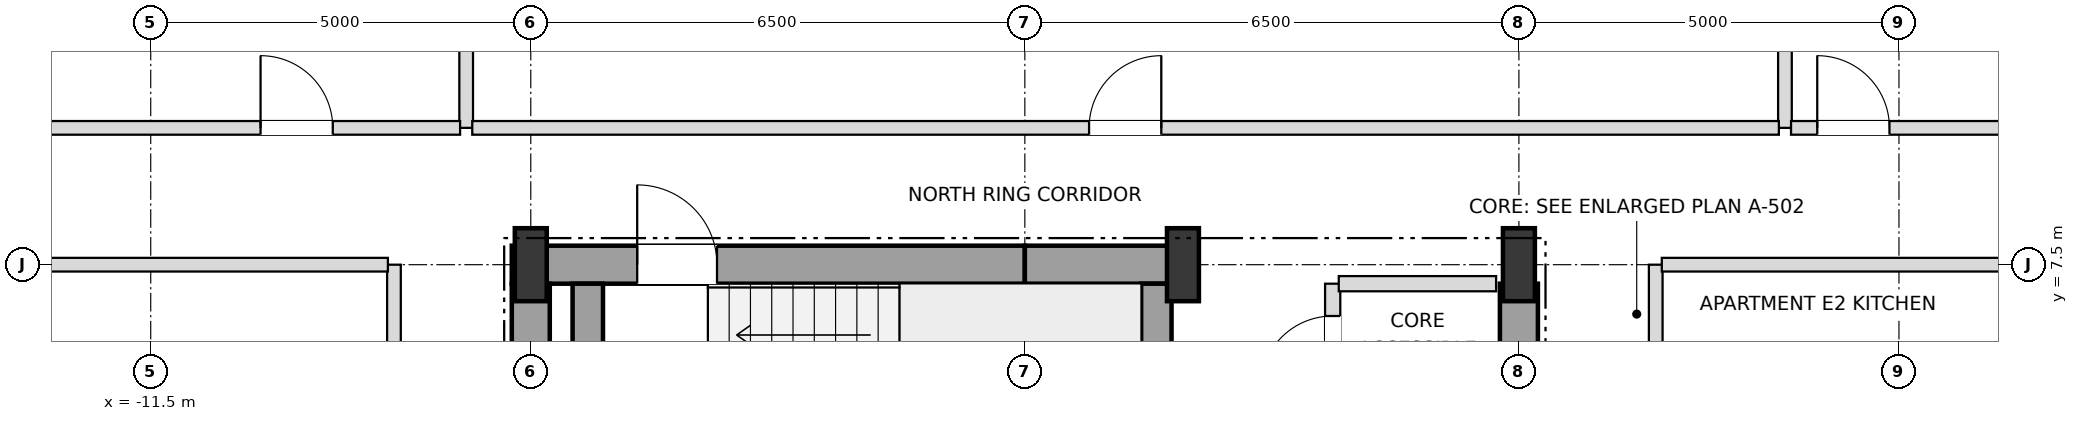
"""IFC4 building model, lengths in metres.
Left out: names, types, materials, properties, quantities, classifications, styles, units other than length and angle.
Written with IfcOpenShell. Run it as: python <this file> out.ifc"""

import sys

from ifc_helpers import new_model, si_unit, direction, frame, frame_2d, origin, origin_2d, place, context, subcontext, project, spatial, rectangle, i_section, extrude, element, fill, save


model = new_model("IFC4")
c1 = context("Model", 3, precision=1e-05, world=origin(), true_north=direction((0.0, 1.0)))
c2 = subcontext(c1, "Body", "Model", "MODEL_VIEW")
j1 = project(units=[si_unit("LENGTHUNIT", "METRE"), si_unit("PLANEANGLEUNIT", "RADIAN")], contexts=[c1])
p1 = place(None, origin())
s1 = spatial("IfcSite", under=j1, at=p1, CompositionType="ELEMENT")
p2 = place(p1, origin())
s2 = spatial("IfcBuilding", under=s1, at=p2, CompositionType="ELEMENT")
p3 = place(p2, frame((0.0, 0.0, 72.0)))
s3 = spatial("IfcBuildingStorey", under=s2, at=p3, CompositionType="ELEMENT", Elevation=72.0)
for number, where, z_axis, x_axis in (
    (1, (-6.5, 7.5, 0.0), (0.0, 0.0, 1.0), (1.0, 0.0, 0.0)),
    (2, (2.08, 7.5, 0.0), (0.0, 0.0, 1.0), (1.0, 0.0, 0.0)),
    (3, (6.5, 7.5, 0.0), (0.0, 0.0, 1.0), (1.0, 0.0, 0.0)),
):
    element("IfcColumn", number, at=place(p3, frame(where, z_axis=z_axis, x_axis=x_axis)), inside=s3, PredefinedType="COLUMN", context=c2, shape_type="SweptSolid", body=[
        extrude(i_section(OverallWidth=0.42, OverallDepth=0.96, WebThickness=0.022, FlangeThickness=0.034, at=origin_2d()), origin(), (0.0, 0.0, 1.0), 3.6),
    ])
p4 = place(p3, frame((-6.75, 7.5, 0.0), z_axis=(0.0, 0.0, 1.0), x_axis=(1.0, 0.0, 0.0)))
e4 = element("IfcWall", 4, at=p4, inside=s3, PredefinedType="SHEAR", context=c2, shape_type="SweptSolid", body=[
    extrude(rectangle(XDim=6.75, YDim=0.5, at=frame_2d((3.375, 0.0))), origin(), (0.0, 0.0, 1.0), 3.38),
])
p5 = place(p4, frame((1.65, 0.0, 0.0)))
e5 = element("IfcOpeningElement", 5, at=p5, cuts=e4, PredefinedType="OPENING", context=c2, shape_type="SweptSolid", body=[
    extrude(rectangle(XDim=1.05, YDim=2.15, at=frame_2d((0.525, 1.075))), frame((0.0, 0.26, 0.0), z_axis=(0.0, -1.0, 0.0), x_axis=(1.0, 0.0, 0.0)), (0.0, 0.0, 1.0), 0.52),
])
p6 = place(p3, frame((0.0, 7.5, 0.0), z_axis=(0.0, 0.0, 1.0), x_axis=(1.0, 0.0, 0.0)))
e6 = element("IfcWall", 6, at=p6, inside=s3, PredefinedType="SHEAR", context=c2, shape_type="SweptSolid", body=[
    extrude(rectangle(XDim=2.08, YDim=0.5, at=frame_2d((1.04, 0.0))), origin(), (0.0, 0.0, 1.0), 3.38),
])
for number, where, z_axis, x_axis in (
    (7, (-6.5, 3.95, 0.0), (0.0, 0.0, 1.0), (0.0, 1.0, 0.0)),
    (8, (6.5, 3.95, 0.0), (0.0, 0.0, 1.0), (0.0, 1.0, 0.0)),
):
    element("IfcWall", number, at=place(p3, frame(where, z_axis=z_axis, x_axis=x_axis)), inside=s3, PredefinedType="SHEAR", context=c2, shape_type="SweptSolid", body=[
        extrude(rectangle(XDim=3.3, YDim=0.5, at=frame_2d((1.65, 0.0))), origin(), (0.0, 0.0, 1.0), 3.38),
    ])
for number, where, z_axis, x_axis in (
    (9, (1.73, 3.95, 0.0), (0.0, 0.0, 1.0), (0.0, 1.0, 0.0)),
    (10, (-5.75, 3.95, 0.0), (0.0, 0.0, 1.0), (0.0, 1.0, 0.0)),
):
    element("IfcWall", number, at=place(p3, frame(where, z_axis=z_axis, x_axis=x_axis)), inside=s3, PredefinedType="SHEAR", context=c2, shape_type="SweptSolid", body=[
        extrude(rectangle(XDim=3.3, YDim=0.4, at=frame_2d((1.65, 0.0))), origin(), (0.0, 0.0, 1.0), 3.38),
    ])
p7 = place(p3, frame((-8.3, -7.5, 0.0), z_axis=(0.0, 0.0, 1.0), x_axis=(0.0, 1.0, 0.0)))
e11 = element("IfcWall", 11, at=p7, inside=s3, PredefinedType="PARTITIONING", context=c2, shape_type="SweptSolid", body=[
    extrude(rectangle(XDim=15.0, YDim=0.18, at=frame_2d((7.5, 0.0))), origin(), (0.0, 0.0, 1.0), 3.38),
])
p8 = place(p7, frame((3.475, 0.0, 0.0)))
e12 = element("IfcOpeningElement", 12, at=p8, cuts=e11, PredefinedType="OPENING", context=c2, shape_type="SweptSolid", body=[
    extrude(rectangle(XDim=0.95, YDim=2.15, at=frame_2d((0.475, 1.075))), frame((0.0, 0.1, 0.0), z_axis=(0.0, -1.0, 0.0), x_axis=(1.0, 0.0, 0.0)), (0.0, 0.0, 1.0), 0.2),
])
p9 = place(p3, frame((-7.35, 9.3, 0.0), z_axis=(0.0, 0.0, 1.0), x_axis=(0.0, 1.0, 0.0)))
e13 = element("IfcWall", 13, at=p9, inside=s3, PredefinedType="PARTITIONING", context=c2, shape_type="SweptSolid", body=[
    extrude(rectangle(XDim=15.6, YDim=0.18, at=frame_2d((7.8, 0.0))), origin(), (0.0, 0.0, 1.0), 2.816),
])
p10 = place(p3, frame((4.05, 5.55, 0.0), z_axis=(0.0, 0.0, 1.0), x_axis=(0.0, 1.0, 0.0)))
e14 = element("IfcWall", 14, at=p10, inside=s3, PredefinedType="SOLIDWALL", context=c2, shape_type="SweptSolid", body=[
    extrude(rectangle(XDim=1.7, YDim=0.2, at=frame_2d((0.85, 0.0))), origin(), (0.0, 0.0, 1.0), 3.38),
])
p11 = place(p10, frame((0.325, 0.0, 0.0)))
e15 = element("IfcOpeningElement", 15, at=p11, cuts=e14, PredefinedType="OPENING", context=c2, shape_type="SweptSolid", body=[
    extrude(rectangle(XDim=0.95, YDim=2.15, at=frame_2d((0.475, 1.075))), frame((0.0, 0.11, 0.0), z_axis=(0.0, -1.0, 0.0), x_axis=(1.0, 0.0, 0.0)), (0.0, 0.0, 1.0), 0.22),
])
p12 = place(p3, frame((8.3, -7.5, 0.0), z_axis=(0.0, 0.0, 1.0), x_axis=(0.0, 1.0, 0.0)))
e16 = element("IfcWall", 16, at=p12, inside=s3, PredefinedType="PARTITIONING", context=c2, shape_type="SweptSolid", body=[
    extrude(rectangle(XDim=15.0, YDim=0.18, at=frame_2d((7.5, 0.0))), origin(), (0.0, 0.0, 1.0), 3.38),
])
p13 = place(p12, frame((3.305, 0.0, 0.0)))
e17 = element("IfcOpeningElement", 17, at=p13, cuts=e16, PredefinedType="OPENING", context=c2, shape_type="SweptSolid", body=[
    extrude(rectangle(XDim=0.95, YDim=2.15, at=frame_2d((0.475, 1.075))), frame((0.0, 0.1, 0.0), z_axis=(0.0, -1.0, 0.0), x_axis=(1.0, 0.0, 0.0)), (0.0, 0.0, 1.0), 0.2),
])
p14 = place(p12, frame((10.805, 0.0, 0.0)))
e18 = element("IfcOpeningElement", 18, at=p14, cuts=e16, PredefinedType="OPENING", context=c2, shape_type="SweptSolid", body=[
    extrude(rectangle(XDim=0.95, YDim=2.15, at=frame_2d((0.475, 1.075))), frame((0.0, 0.1, 0.0), z_axis=(0.0, -1.0, 0.0), x_axis=(1.0, 0.0, 0.0)), (0.0, 0.0, 1.0), 0.2),
])
p15 = place(p3, frame((10.0, 9.3, 0.0), z_axis=(0.0, 0.0, 1.0), x_axis=(0.0, 1.0, 0.0)))
e19 = element("IfcWall", 19, at=p15, inside=s3, PredefinedType="PARTITIONING", context=c2, shape_type="SweptSolid", body=[
    extrude(rectangle(XDim=15.6, YDim=0.18, at=frame_2d((7.8, 0.0))), origin(), (0.0, 0.0, 1.0), 2.816),
])
p16 = place(p3, frame((4.13, 7.25, 0.0), z_axis=(0.0, 0.0, 1.0), x_axis=(1.0, 0.0, 0.0)))
e20 = element("IfcWall", 20, at=p16, inside=s3, PredefinedType="SOLIDWALL", context=c2, shape_type="SweptSolid", body=[
    extrude(rectangle(XDim=2.07, YDim=0.2, at=frame_2d((1.035, 0.0))), origin(), (0.0, 0.0, 1.0), 3.38),
])
for number, where, z_axis, x_axis in (
    (21, (-16.02, 7.5, 0.0), (0.0, 0.0, 1.0), (1.0, 0.0, 0.0)),
    (22, (8.38, 7.5, 0.0), (0.0, 0.0, 1.0), (1.0, 0.0, 0.0)),
):
    element("IfcWall", number, at=place(p3, frame(where, z_axis=z_axis, x_axis=x_axis)), inside=s3, PredefinedType="PARTITIONING", context=c2, shape_type="SweptSolid", body=[
        extrude(rectangle(XDim=7.64, YDim=0.18, at=frame_2d((3.82, 0.0))), origin(), (0.0, 0.0, 1.0), 2.816),
    ])
p17 = place(p3, frame((-18.4, 9.3, 0.0), z_axis=(0.0, 0.0, 1.0), x_axis=(1.0, 0.0, 0.0)))
e23 = element("IfcWall", 23, at=p17, inside=s3, PredefinedType="PARTITIONING", context=c2, shape_type="SweptSolid", body=[
    extrude(rectangle(XDim=10.97, YDim=0.18, at=frame_2d((5.485, 0.0))), origin(), (0.0, 0.0, 1.0), 2.816),
])
p18 = place(p17, frame((8.345, 0.0, 0.0)))
e24 = element("IfcOpeningElement", 24, at=p18, cuts=e23, PredefinedType="OPENING", context=c2, shape_type="SweptSolid", body=[
    extrude(rectangle(XDim=0.95, YDim=2.15, at=frame_2d((0.475, 1.075))), frame((0.0, 0.1, 0.0), z_axis=(0.0, -1.0, 0.0), x_axis=(1.0, 0.0, 0.0)), (0.0, 0.0, 1.0), 0.2),
])
p19 = place(p3, frame((-7.27, 9.3, 0.0), z_axis=(0.0, 0.0, 1.0), x_axis=(1.0, 0.0, 0.0)))
e25 = element("IfcWall", 25, at=p19, inside=s3, PredefinedType="PARTITIONING", context=c2, shape_type="SweptSolid", body=[
    extrude(rectangle(XDim=17.19, YDim=0.18, at=frame_2d((8.595, 0.0))), origin(), (0.0, 0.0, 1.0), 2.816),
])
p20 = place(p19, frame((8.115, 0.0, 0.0)))
e26 = element("IfcOpeningElement", 26, at=p20, cuts=e25, PredefinedType="OPENING", context=c2, shape_type="SweptSolid", body=[
    extrude(rectangle(XDim=0.95, YDim=2.15, at=frame_2d((0.475, 1.075))), frame((0.0, 0.1, 0.0), z_axis=(0.0, -1.0, 0.0), x_axis=(1.0, 0.0, 0.0)), (0.0, 0.0, 1.0), 0.2),
])
p21 = place(p3, frame((10.08, 9.3, 0.0), z_axis=(0.0, 0.0, 1.0), x_axis=(1.0, 0.0, 0.0)))
e27 = element("IfcWall", 27, at=p21, inside=s3, PredefinedType="PARTITIONING", context=c2, shape_type="SweptSolid", body=[
    extrude(rectangle(XDim=8.32, YDim=0.18, at=frame_2d((4.16, 0.0))), origin(), (0.0, 0.0, 1.0), 2.816),
])
p22 = place(p21, frame((0.345, 0.0, 0.0)))
e28 = element("IfcOpeningElement", 28, at=p22, cuts=e27, PredefinedType="OPENING", context=c2, shape_type="SweptSolid", body=[
    extrude(rectangle(XDim=0.95, YDim=2.15, at=frame_2d((0.475, 1.075))), frame((0.0, 0.1, 0.0), z_axis=(0.0, -1.0, 0.0), x_axis=(1.0, 0.0, 0.0)), (0.0, 0.0, 1.0), 0.2),
])
p23 = place(p5, origin())
e29 = element("IfcDoor", 29, at=p23, inside=s3, OperationType="SINGLE_SWING_LEFT", PredefinedType="DOOR", context=c2, shape_type="SweptSolid", body=[
    extrude(rectangle(XDim=1.05, YDim=2.15, at=frame_2d((0.525, 1.075))), frame((0.0, 0.025, 0.0), z_axis=(0.0, -1.0, 0.0), x_axis=(1.0, 0.0, 0.0)), (0.0, 0.0, 1.0), 0.05),
])
fill(e5, e29)
p24 = place(p11, origin())
e30 = element("IfcDoor", 30, at=p24, inside=s3, OperationType="SINGLE_SWING_LEFT", PredefinedType="DOOR", context=c2, shape_type="SweptSolid", body=[
    extrude(rectangle(XDim=0.95, YDim=2.15, at=frame_2d((0.475, 1.075))), frame((0.0, 0.025, 0.0), z_axis=(0.0, -1.0, 0.0), x_axis=(1.0, 0.0, 0.0)), (0.0, 0.0, 1.0), 0.05),
])
fill(e15, e30)
p25 = place(p18, origin())
e31 = element("IfcDoor", 31, at=p25, inside=s3, OperationType="SINGLE_SWING_LEFT", PredefinedType="DOOR", context=c2, shape_type="SweptSolid", body=[
    extrude(rectangle(XDim=0.95, YDim=2.15, at=frame_2d((0.475, 1.075))), frame((0.0, 0.025, 0.0), z_axis=(0.0, -1.0, 0.0), x_axis=(1.0, 0.0, 0.0)), (0.0, 0.0, 1.0), 0.05),
])
fill(e24, e31)
p26 = place(p20, origin())
e32 = element("IfcDoor", 32, at=p26, inside=s3, OperationType="SINGLE_SWING_RIGHT", PredefinedType="DOOR", context=c2, shape_type="SweptSolid", body=[
    extrude(rectangle(XDim=0.95, YDim=2.15, at=frame_2d((0.475, 1.075))), frame((0.0, 0.025, 0.0), z_axis=(0.0, -1.0, 0.0), x_axis=(1.0, 0.0, 0.0)), (0.0, 0.0, 1.0), 0.05),
])
fill(e26, e32)
p27 = place(p22, origin())
e33 = element("IfcDoor", 33, at=p27, inside=s3, OperationType="SINGLE_SWING_LEFT", PredefinedType="DOOR", context=c2, shape_type="SweptSolid", body=[
    extrude(rectangle(XDim=0.95, YDim=2.15, at=frame_2d((0.475, 1.075))), frame((0.0, 0.025, 0.0), z_axis=(0.0, -1.0, 0.0), x_axis=(1.0, 0.0, 0.0)), (0.0, 0.0, 1.0), 0.05),
])
fill(e28, e33)
save(model, sys.argv[1])
